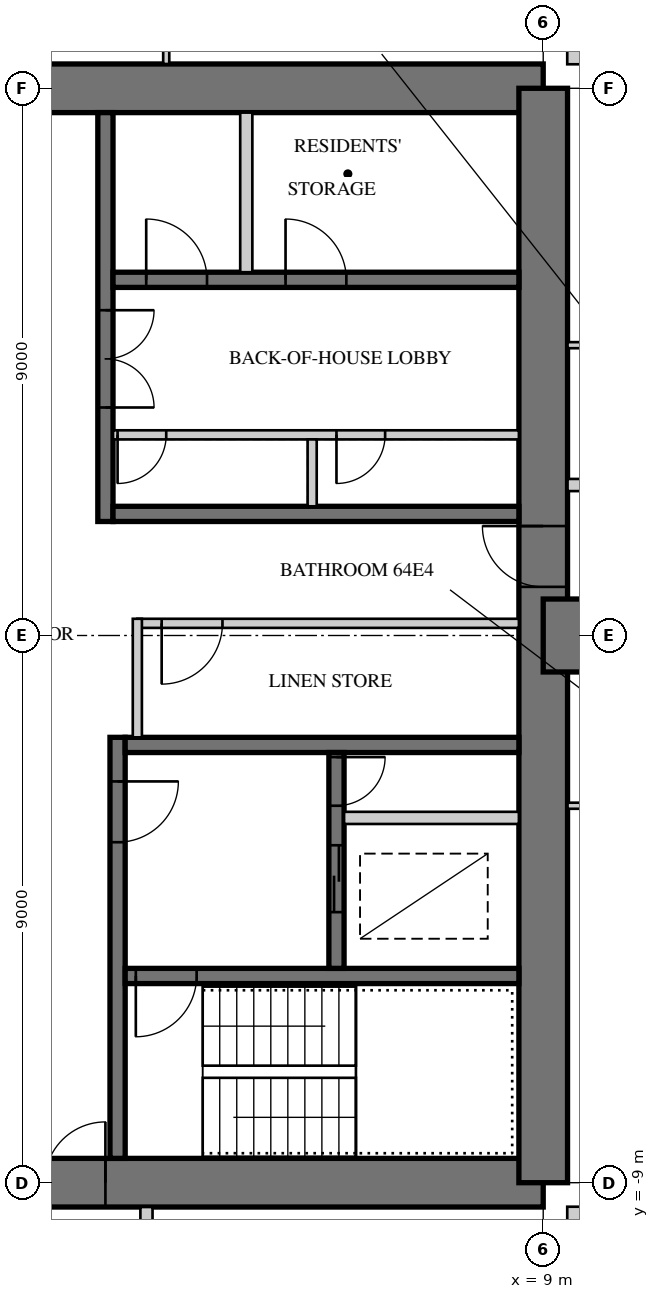
"""IFC4 building model, lengths in metres.
Left out: names, types, materials, properties, quantities, classifications, styles, units other than length and angle.
Written with IfcOpenShell. Run it as: python <this file> out.ifc"""

import sys

from ifc_helpers import new_model, si_unit, direction, frame, frame_2d, origin, place, context, subcontext, project, spatial, rectangle, extrude, element, fill, save


model = new_model("IFC4")
c1 = context("Model", 3, precision=1e-05, world=origin(), true_north=direction((0.0, 1.0)))
c2 = subcontext(c1, "Body", "Model", "MODEL_VIEW")
j1 = project(units=[si_unit("LENGTHUNIT", "METRE"), si_unit("PLANEANGLEUNIT", "RADIAN")], contexts=[c1])
p1 = place(None, origin())
s1 = spatial("IfcSite", under=j1, at=p1, CompositionType="ELEMENT")
p2 = place(p1, origin())
s2 = spatial("IfcBuilding", under=s1, at=p2, CompositionType="ELEMENT")
p3 = place(p2, frame((0.0, 0.0, 249.3)))
s3 = spatial("IfcBuildingStorey", under=s2, at=p3, CompositionType="ELEMENT", Elevation=249.3)
p4 = place(p3, frame((9.0, 9.0, 0.0), z_axis=(0.0, 0.0, 1.0), x_axis=(-1.0, 0.0, 0.0)))
e1 = element("IfcWall", 1, at=p4, inside=s3, PredefinedType="SHEAR", context=c2, shape_type="SweptSolid", body=[
    extrude(rectangle(XDim=18.0, YDim=0.8, at=frame_2d((9.0, 0.0))), origin(), (0.0, 0.0, 1.0), 3.4),
])
p5 = place(p4, frame((9.8, 0.0, 0.0)))
e2 = element("IfcOpeningElement", 2, at=p5, cuts=e1, PredefinedType="OPENING", context=c2, shape_type="SweptSolid", body=[
    extrude(rectangle(XDim=1.0, YDim=2.4, at=frame_2d((0.5, 1.2))), frame((0.0, 0.41, 0.0), z_axis=(0.0, -1.0, 0.0), x_axis=(1.0, 0.0, 0.0)), (0.0, 0.0, 1.0), 0.82),
])
p6 = place(p3, frame((-9.0, -9.0, 0.0), z_axis=(0.0, 0.0, 1.0), x_axis=(1.0, 0.0, 0.0)))
e3 = element("IfcWall", 3, at=p6, inside=s3, PredefinedType="SHEAR", context=c2, shape_type="SweptSolid", body=[
    extrude(rectangle(XDim=18.0, YDim=0.8, at=frame_2d((9.0, 0.0))), origin(), (0.0, 0.0, 1.0), 3.4),
])
p7 = place(p6, frame((9.8, 0.0, 0.0)))
e4 = element("IfcOpeningElement", 4, at=p7, cuts=e3, PredefinedType="OPENING", context=c2, shape_type="SweptSolid", body=[
    extrude(rectangle(XDim=1.0, YDim=2.4, at=frame_2d((0.5, 1.2))), frame((0.0, 0.41, 0.0), z_axis=(0.0, -1.0, 0.0), x_axis=(1.0, 0.0, 0.0)), (0.0, 0.0, 1.0), 0.82),
])
p8 = place(p3, frame((9.0, -9.0, 0.0), z_axis=(0.0, 0.0, 1.0), x_axis=(0.0, 1.0, 0.0)))
e5 = element("IfcWall", 5, at=p8, inside=s3, PredefinedType="SHEAR", context=c2, shape_type="SweptSolid", body=[
    extrude(rectangle(XDim=18.0, YDim=0.8, at=frame_2d((9.0, 0.0))), origin(), (0.0, 0.0, 1.0), 3.4),
])
p9 = place(p8, frame((9.8, 0.0, 0.0)))
e6 = element("IfcOpeningElement", 6, at=p9, cuts=e5, PredefinedType="OPENING", context=c2, shape_type="SweptSolid", body=[
    extrude(rectangle(XDim=1.0, YDim=2.4, at=frame_2d((0.5, 1.2))), frame((0.0, 0.41, 0.0), z_axis=(0.0, -1.0, 0.0), x_axis=(1.0, 0.0, 0.0)), (0.0, 0.0, 1.0), 0.82),
])
p10 = place(p3, frame((1.8, 1.875, 0.0), z_axis=(0.0, 0.0, 1.0), x_axis=(0.0, 1.0, 0.0)))
e7 = element("IfcWall", 7, at=p10, inside=s3, PredefinedType="SHEAR", context=c2, shape_type="SweptSolid", body=[
    extrude(rectangle(XDim=6.725, YDim=0.25, at=frame_2d((3.363, 0.0))), origin(), (0.0, 0.0, 1.0), 3.4),
])
p11 = place(p10, frame((1.875, 0.0, 0.0)))
e8 = element("IfcOpeningElement", 8, at=p11, cuts=e7, PredefinedType="OPENING", context=c2, shape_type="SweptSolid", body=[
    extrude(rectangle(XDim=1.6, YDim=2.4, at=frame_2d((0.8, 1.2))), frame((0.0, 0.135, 0.0), z_axis=(0.0, -1.0, 0.0), x_axis=(1.0, 0.0, 0.0)), (0.0, 0.0, 1.0), 0.27),
])
p12 = place(p3, frame((1.925, 2.0, 0.0), z_axis=(0.0, 0.0, 1.0), x_axis=(1.0, 0.0, 0.0)))
e9 = element("IfcWall", 9, at=p12, inside=s3, PredefinedType="SHEAR", context=c2, shape_type="SweptSolid", body=[
    extrude(rectangle(XDim=6.675, YDim=0.25, at=frame_2d((3.337, 0.0))), origin(), (0.0, 0.0, 1.0), 3.4),
])
p13 = place(p3, frame((1.925, 5.85, 0.0), z_axis=(0.0, 0.0, 1.0), x_axis=(1.0, 0.0, 0.0)))
e10 = element("IfcWall", 10, at=p13, inside=s3, PredefinedType="SHEAR", context=c2, shape_type="SweptSolid", body=[
    extrude(rectangle(XDim=6.675, YDim=0.25, at=frame_2d((3.337, 0.0))), origin(), (0.0, 0.0, 1.0), 3.4),
])
p14 = place(p13, frame((0.546, 0.0, 0.0)))
e11 = element("IfcOpeningElement", 11, at=p14, cuts=e10, PredefinedType="OPENING", context=c2, shape_type="SweptSolid", body=[
    extrude(rectangle(XDim=1.0, YDim=2.1, at=frame_2d((0.5, 1.05))), frame((0.0, 0.135, 0.0), z_axis=(0.0, -1.0, 0.0), x_axis=(1.0, 0.0, 0.0)), (0.0, 0.0, 1.0), 0.27),
])
p15 = place(p13, frame((2.837, 0.0, 0.0)))
e12 = element("IfcOpeningElement", 12, at=p15, cuts=e10, PredefinedType="OPENING", context=c2, shape_type="SweptSolid", body=[
    extrude(rectangle(XDim=1.0, YDim=2.1, at=frame_2d((0.5, 1.05))), frame((0.0, 0.135, 0.0), z_axis=(0.0, -1.0, 0.0), x_axis=(1.0, 0.0, 0.0)), (0.0, 0.0, 1.0), 0.27),
])
p16 = place(p3, frame((1.925, 3.3, 0.0), z_axis=(0.0, 0.0, 1.0), x_axis=(1.0, 0.0, 0.0)))
e13 = element("IfcWall", 13, at=p16, inside=s3, PredefinedType="PARTITIONING", context=c2, shape_type="SweptSolid", body=[
    extrude(rectangle(XDim=6.675, YDim=0.15, at=frame_2d((3.337, 0.0))), origin(), (0.0, 0.0, 1.0), 3.4),
])
p17 = place(p16, frame((0.075, 0.0, 0.0)))
e14 = element("IfcOpeningElement", 14, at=p17, cuts=e13, PredefinedType="OPENING", context=c2, shape_type="SweptSolid", body=[
    extrude(rectangle(XDim=0.8, YDim=2.1, at=frame_2d((0.4, 1.05))), frame((0.0, 0.085, 0.0), z_axis=(0.0, -1.0, 0.0), x_axis=(1.0, 0.0, 0.0)), (0.0, 0.0, 1.0), 0.17),
])
p18 = place(p16, frame((3.675, 0.0, 0.0)))
e15 = element("IfcOpeningElement", 15, at=p18, cuts=e13, PredefinedType="OPENING", context=c2, shape_type="SweptSolid", body=[
    extrude(rectangle(XDim=0.8, YDim=2.1, at=frame_2d((0.4, 1.05))), frame((0.0, 0.085, 0.0), z_axis=(0.0, -1.0, 0.0), x_axis=(1.0, 0.0, 0.0)), (0.0, 0.0, 1.0), 0.17),
])
p19 = place(p3, frame((5.2, 2.125, 0.0), z_axis=(0.0, 0.0, 1.0), x_axis=(0.0, 1.0, 0.0)))
e16 = element("IfcWall", 16, at=p19, inside=s3, PredefinedType="PARTITIONING", context=c2, shape_type="SweptSolid", body=[
    extrude(rectangle(XDim=1.1, YDim=0.15, at=frame_2d((0.55, 0.0))), origin(), (0.0, 0.0, 1.0), 3.4),
])
p20 = place(p3, frame((4.117, 5.975, 0.0), z_axis=(0.0, 0.0, 1.0), x_axis=(0.0, 1.0, 0.0)))
e17 = element("IfcWall", 17, at=p20, inside=s3, PredefinedType="PARTITIONING", context=c2, shape_type="SweptSolid", body=[
    extrude(rectangle(XDim=2.625, YDim=0.2, at=frame_2d((1.312, 0.0))), origin(), (0.0, 0.0, 1.0), 3.4),
])
p21 = place(p3, frame((2.0, -1.675, 0.0), z_axis=(0.0, 0.0, 1.0), x_axis=(0.0, -1.0, 0.0)))
e18 = element("IfcWall", 18, at=p21, inside=s3, PredefinedType="SHEAR", context=c2, shape_type="SweptSolid", body=[
    extrude(rectangle(XDim=6.925, YDim=0.25, at=frame_2d((3.462, 0.0))), origin(), (0.0, 0.0, 1.0), 3.4),
])
p22 = place(p21, frame((0.725, 0.0, 0.0)))
e19 = element("IfcOpeningElement", 19, at=p22, cuts=e18, PredefinedType="OPENING", context=c2, shape_type="SweptSolid", body=[
    extrude(rectangle(XDim=1.0, YDim=2.1, at=frame_2d((0.5, 1.05))), frame((0.0, 0.135, 0.0), z_axis=(0.0, -1.0, 0.0), x_axis=(1.0, 0.0, 0.0)), (0.0, 0.0, 1.0), 0.27),
])
p23 = place(p3, frame((2.125, -1.8, 0.0), z_axis=(0.0, 0.0, 1.0), x_axis=(1.0, 0.0, 0.0)))
e20 = element("IfcWall", 20, at=p23, inside=s3, PredefinedType="SHEAR", context=c2, shape_type="SweptSolid", body=[
    extrude(rectangle(XDim=6.475, YDim=0.25, at=frame_2d((3.238, 0.0))), origin(), (0.0, 0.0, 1.0), 3.4),
])
p24 = place(p3, frame((2.125, -5.6, 0.0), z_axis=(0.0, 0.0, 1.0), x_axis=(1.0, 0.0, 0.0)))
e21 = element("IfcWall", 21, at=p24, inside=s3, PredefinedType="SHEAR", context=c2, shape_type="SweptSolid", body=[
    extrude(rectangle(XDim=6.475, YDim=0.25, at=frame_2d((3.238, 0.0))), origin(), (0.0, 0.0, 1.0), 3.4),
])
p25 = place(p24, frame((0.175, 0.0, 0.0)))
e22 = element("IfcOpeningElement", 22, at=p25, cuts=e21, PredefinedType="OPENING", context=c2, shape_type="SweptSolid", body=[
    extrude(rectangle(XDim=1.0, YDim=2.1, at=frame_2d((0.5, 1.05))), frame((0.0, 0.135, 0.0), z_axis=(0.0, -1.0, 0.0), x_axis=(1.0, 0.0, 0.0)), (0.0, 0.0, 1.0), 0.27),
])
p26 = place(p3, frame((5.6, -1.925, 0.0), z_axis=(0.0, 0.0, 1.0), x_axis=(0.0, -1.0, 0.0)))
e23 = element("IfcWall", 23, at=p26, inside=s3, PredefinedType="SHEAR", context=c2, shape_type="SweptSolid", body=[
    extrude(rectangle(XDim=3.55, YDim=0.25, at=frame_2d((1.775, 0.0))), origin(), (0.0, 0.0, 1.0), 3.4),
])
p27 = place(p26, frame((1.525, 0.0, 0.0)))
e24 = element("IfcOpeningElement", 24, at=p27, cuts=e23, PredefinedType="OPENING", context=c2, shape_type="SweptSolid", body=[
    extrude(rectangle(XDim=1.1, YDim=2.2, at=frame_2d((0.55, 1.1))), frame((0.0, 0.135, 0.0), z_axis=(0.0, -1.0, 0.0), x_axis=(1.0, 0.0, 0.0)), (0.0, 0.0, 1.0), 0.27),
])
p28 = place(p26, frame((0.075, 0.0, 0.0)))
e25 = element("IfcOpeningElement", 25, at=p28, cuts=e23, PredefinedType="OPENING", context=c2, shape_type="SweptSolid", body=[
    extrude(rectangle(XDim=0.8, YDim=2.1, at=frame_2d((0.4, 1.05))), frame((0.0, 0.135, 0.0), z_axis=(0.0, -1.0, 0.0), x_axis=(1.0, 0.0, 0.0)), (0.0, 0.0, 1.0), 0.27),
])
p29 = place(p3, frame((5.725, -3.0, 0.0), z_axis=(0.0, 0.0, 1.0), x_axis=(1.0, 0.0, 0.0)))
e26 = element("IfcWall", 26, at=p29, inside=s3, PredefinedType="PARTITIONING", context=c2, shape_type="SweptSolid", body=[
    extrude(rectangle(XDim=2.875, YDim=0.2, at=frame_2d((1.438, 0.0))), origin(), (0.0, 0.0, 1.0), 3.4),
])
p30 = place(p3, frame((9.0, 0.0, 0.0), z_axis=(0.0, 0.0, 1.0), x_axis=(1.0, 0.0, 0.0)))
e27 = element("IfcWall", 27, at=p30, inside=s3, PredefinedType="SHEAR", context=c2, shape_type="SweptSolid", body=[
    extrude(rectangle(XDim=9.0, YDim=1.2, at=frame_2d((4.5, 0.0))), origin(), (0.0, 0.0, 1.0), 3.4),
])
p31 = place(p30, frame((3.8, 0.0, 0.0)))
e28 = element("IfcOpeningElement", 28, at=p31, cuts=e27, PredefinedType="OPENING", context=c2, shape_type="SweptSolid", body=[
    extrude(rectangle(XDim=1.0, YDim=2.15, at=frame_2d((0.5, 1.075))), frame((0.0, 0.61, 0.0), z_axis=(0.0, -1.0, 0.0), x_axis=(1.0, 0.0, 0.0)), (0.0, 0.0, 1.0), 1.22),
])
p32 = place(p30, frame((7.0, 0.0, 0.0)))
e29 = element("IfcOpeningElement", 29, at=p32, cuts=e27, PredefinedType="OPENING", context=c2, shape_type="SweptSolid", body=[
    extrude(rectangle(XDim=1.0, YDim=2.2, at=frame_2d((0.5, 1.1))), frame((0.0, 0.61, 0.0), z_axis=(0.0, -1.0, 0.0), x_axis=(1.0, 0.0, 0.0)), (0.0, 0.0, 1.0), 1.22),
])
p33 = place(p3, frame((9.395, -9.52, 0.0), z_axis=(0.0, 0.0, 1.0), x_axis=(1.0, 0.0, 0.0)))
e30 = element("IfcWall", 30, at=p33, inside=s3, PredefinedType="SOLIDWALL", context=c2, shape_type="SweptSolid", body=[
    extrude(rectangle(XDim=3.125, YDim=0.25, at=frame_2d((1.562, 0.0))), origin(), (0.0, 0.0, 1.0), 3.15),
])
p34 = place(p33, frame((0.6, 0.0, 0.0)))
e31 = element("IfcOpeningElement", 31, at=p34, cuts=e30, PredefinedType="OPENING", context=c2, shape_type="SweptSolid", body=[
    extrude(rectangle(XDim=1.0, YDim=2.2, at=frame_2d((0.5, 1.1))), frame((0.0, 0.135, 0.0), z_axis=(0.0, -1.0, 0.0), x_axis=(1.0, 0.0, 0.0)), (0.0, 0.0, 1.0), 0.27),
])
p35 = place(p3, frame((9.52, 9.395, 0.0), z_axis=(0.0, 0.0, 1.0), x_axis=(0.0, 1.0, 0.0)))
e32 = element("IfcWall", 32, at=p35, inside=s3, PredefinedType="SOLIDWALL", context=c2, shape_type="SweptSolid", body=[
    extrude(rectangle(XDim=3.125, YDim=0.25, at=frame_2d((1.562, 0.0))), origin(), (0.0, 0.0, 1.0), 3.15),
])
p36 = place(p35, frame((0.6, 0.0, 0.0)))
e33 = element("IfcOpeningElement", 33, at=p36, cuts=e32, PredefinedType="OPENING", context=c2, shape_type="SweptSolid", body=[
    extrude(rectangle(XDim=1.0, YDim=2.2, at=frame_2d((0.5, 1.1))), frame((0.0, 0.135, 0.0), z_axis=(0.0, -1.0, 0.0), x_axis=(1.0, 0.0, 0.0)), (0.0, 0.0, 1.0), 0.27),
])
p37 = place(p3, frame((2.325, 0.2, 0.0), z_axis=(0.0, 0.0, 1.0), x_axis=(1.0, 0.0, 0.0)))
e34 = element("IfcWall", 34, at=p37, inside=s3, PredefinedType="PARTITIONING", context=c2, shape_type="SweptSolid", body=[
    extrude(rectangle(XDim=6.275, YDim=0.15, at=frame_2d((3.138, 0.0))), origin(), (0.0, 0.0, 1.0), 3.15),
])
p38 = place(p37, frame((0.4, 0.0, 0.0)))
e35 = element("IfcOpeningElement", 35, at=p38, cuts=e34, PredefinedType="OPENING", context=c2, shape_type="SweptSolid", body=[
    extrude(rectangle(XDim=1.0, YDim=2.1, at=frame_2d((0.5, 1.05))), frame((0.0, 0.085, 0.0), z_axis=(0.0, -1.0, 0.0), x_axis=(1.0, 0.0, 0.0)), (0.0, 0.0, 1.0), 0.17),
])
p39 = place(p3, frame((2.325, -1.675, 0.0), z_axis=(0.0, 0.0, 1.0), x_axis=(0.0, 1.0, 0.0)))
e36 = element("IfcWall", 36, at=p39, inside=s3, PredefinedType="PARTITIONING", context=c2, shape_type="SweptSolid", body=[
    extrude(rectangle(XDim=1.95, YDim=0.15, at=frame_2d((0.975, 0.0))), origin(), (0.0, 0.0, 1.0), 3.15),
])
p40 = place(p3, frame((2.8, 9.4, 0.0), z_axis=(0.0, 0.0, 1.0), x_axis=(0.0, 1.0, 0.0)))
e37 = element("IfcWall", 37, at=p40, inside=s3, PredefinedType="PARTITIONING", context=c2, shape_type="SweptSolid", body=[
    extrude(rectangle(XDim=2.65, YDim=0.1, at=frame_2d((1.325, 0.0))), origin(), (0.0, 0.0, 1.0), 3.15),
])
p41 = place(p3, frame((9.4, 4.775, 0.0), z_axis=(0.0, 0.0, 1.0), x_axis=(1.0, 0.0, 0.0)))
e38 = element("IfcWall", 38, at=p41, inside=s3, PredefinedType="PARTITIONING", context=c2, shape_type="SweptSolid", body=[
    extrude(rectangle(XDim=3.25, YDim=0.1, at=frame_2d((1.625, 0.0))), origin(), (0.0, 0.0, 1.0), 3.15),
])
p42 = place(p3, frame((9.4, -2.8, 0.0), z_axis=(0.0, 0.0, 1.0), x_axis=(1.0, 0.0, 0.0)))
e39 = element("IfcWall", 39, at=p42, inside=s3, PredefinedType="PARTITIONING", context=c2, shape_type="SweptSolid", body=[
    extrude(rectangle(XDim=2.65, YDim=0.1, at=frame_2d((1.325, 0.0))), origin(), (0.0, 0.0, 1.0), 3.15),
])
p43 = place(p3, frame((9.4, 2.475, 0.0), z_axis=(0.0, 0.0, 1.0), x_axis=(1.0, 0.0, 0.0)))
e40 = element("IfcWall", 40, at=p43, inside=s3, PredefinedType="SOLIDWALL", context=c2, shape_type="SweptSolid", body=[
    extrude(rectangle(XDim=5.6, YDim=0.2, at=frame_2d((2.8, 0.0))), origin(), (0.0, 0.0, 1.0), 3.15),
])
p44 = place(p43, frame((3.75, 0.0, 0.0)))
e41 = element("IfcOpeningElement", 41, at=p44, cuts=e40, PredefinedType="OPENING", context=c2, shape_type="SweptSolid", body=[
    extrude(rectangle(XDim=1.0, YDim=2.15, at=frame_2d((0.5, 1.075))), frame((0.0, 0.11, 0.0), z_axis=(0.0, -1.0, 0.0), x_axis=(1.0, 0.0, 0.0)), (0.0, 0.0, 1.0), 0.22),
])
p45 = place(p3, frame((2.475, -9.4, 0.0), z_axis=(0.0, 0.0, 1.0), x_axis=(0.0, -1.0, 0.0)))
e42 = element("IfcWall", 42, at=p45, inside=s3, PredefinedType="SOLIDWALL", context=c2, shape_type="SweptSolid", body=[
    extrude(rectangle(XDim=5.6, YDim=0.2, at=frame_2d((2.8, 0.0))), origin(), (0.0, 0.0, 1.0), 3.15),
])
p46 = place(p45, frame((1.2, 0.0, 0.0)))
e43 = element("IfcOpeningElement", 43, at=p46, cuts=e42, PredefinedType="OPENING", context=c2, shape_type="SweptSolid", body=[
    extrude(rectangle(XDim=1.0, YDim=2.2, at=frame_2d((0.5, 1.1))), frame((0.0, 0.11, 0.0), z_axis=(0.0, -1.0, 0.0), x_axis=(1.0, 0.0, 0.0)), (0.0, 0.0, 1.0), 0.22),
])
p47 = place(p38, frame((1.0, 0.0, 0.0), z_axis=(0.0, 0.0, 1.0), x_axis=(-1.0, 0.0, 0.0)))
e44 = element("IfcDoor", 44, at=p47, inside=s3, OperationType="SINGLE_SWING_RIGHT", PredefinedType="DOOR", context=c2, shape_type="SweptSolid", body=[
    extrude(rectangle(XDim=1.0, YDim=2.1, at=frame_2d((0.5, 1.05))), frame((0.0, 0.025, 0.0), z_axis=(0.0, -1.0, 0.0), x_axis=(1.0, 0.0, 0.0)), (0.0, 0.0, 1.0), 0.05),
])
fill(e35, e44)
p48 = place(p7, origin())
e45 = element("IfcDoor", 45, at=p48, inside=s3, OperationType="SINGLE_SWING_RIGHT", PredefinedType="DOOR", context=c2, shape_type="SweptSolid", body=[
    extrude(rectangle(XDim=1.0, YDim=2.4, at=frame_2d((0.5, 1.2))), frame((0.0, 0.055, 0.0), z_axis=(0.0, -1.0, 0.0), x_axis=(1.0, 0.0, 0.0)), (0.0, 0.0, 1.0), 0.05),
])
fill(e4, e45)
p49 = place(p9, origin())
e46 = element("IfcDoor", 46, at=p49, inside=s3, OperationType="SINGLE_SWING_RIGHT", PredefinedType="DOOR", context=c2, shape_type="SweptSolid", body=[
    extrude(rectangle(XDim=1.0, YDim=2.4, at=frame_2d((0.5, 1.2))), frame((0.0, 0.055, 0.0), z_axis=(0.0, -1.0, 0.0), x_axis=(1.0, 0.0, 0.0)), (0.0, 0.0, 1.0), 0.05),
])
fill(e6, e46)
p50 = place(p11, frame((1.6, 0.0, 0.0), z_axis=(0.0, 0.0, 1.0), x_axis=(-1.0, 0.0, 0.0)))
e47 = element("IfcDoor", 47, at=p50, inside=s3, OperationType="DOUBLE_DOOR_SINGLE_SWING", PredefinedType="DOOR", context=c2, shape_type="SweptSolid", body=[
    extrude(rectangle(XDim=1.6, YDim=2.4, at=frame_2d((0.8, 1.2))), frame((0.0, 0.025, 0.0), z_axis=(0.0, -1.0, 0.0), x_axis=(1.0, 0.0, 0.0)), (0.0, 0.0, 1.0), 0.05),
])
fill(e8, e47)
p51 = place(p17, frame((0.8, 0.0, 0.0), z_axis=(0.0, 0.0, 1.0), x_axis=(-1.0, 0.0, 0.0)))
e48 = element("IfcDoor", 48, at=p51, inside=s3, OperationType="SINGLE_SWING_RIGHT", PredefinedType="DOOR", context=c2, shape_type="SweptSolid", body=[
    extrude(rectangle(XDim=0.8, YDim=2.1, at=frame_2d((0.4, 1.05))), frame((0.0, 0.025, 0.0), z_axis=(0.0, -1.0, 0.0), x_axis=(1.0, 0.0, 0.0)), (0.0, 0.0, 1.0), 0.05),
])
fill(e14, e48)
p52 = place(p18, frame((0.8, 0.0, 0.0), z_axis=(0.0, 0.0, 1.0), x_axis=(-1.0, 0.0, 0.0)))
e49 = element("IfcDoor", 49, at=p52, inside=s3, OperationType="SINGLE_SWING_RIGHT", PredefinedType="DOOR", context=c2, shape_type="SweptSolid", body=[
    extrude(rectangle(XDim=0.8, YDim=2.1, at=frame_2d((0.4, 1.05))), frame((0.0, 0.025, 0.0), z_axis=(0.0, -1.0, 0.0), x_axis=(1.0, 0.0, 0.0)), (0.0, 0.0, 1.0), 0.05),
])
fill(e15, e49)
p53 = place(p22, origin())
e50 = element("IfcDoor", 50, at=p53, inside=s3, OperationType="SINGLE_SWING_LEFT", PredefinedType="DOOR", context=c2, shape_type="SweptSolid", body=[
    extrude(rectangle(XDim=1.0, YDim=2.1, at=frame_2d((0.5, 1.05))), frame((0.0, 0.025, 0.0), z_axis=(0.0, -1.0, 0.0), x_axis=(1.0, 0.0, 0.0)), (0.0, 0.0, 1.0), 0.05),
])
fill(e19, e50)
p54 = place(p25, frame((1.0, 0.0, 0.0), z_axis=(0.0, 0.0, 1.0), x_axis=(-1.0, 0.0, 0.0)))
e51 = element("IfcDoor", 51, at=p54, inside=s3, OperationType="SINGLE_SWING_RIGHT", PredefinedType="DOOR", context=c2, shape_type="SweptSolid", body=[
    extrude(rectangle(XDim=1.0, YDim=2.1, at=frame_2d((0.5, 1.05))), frame((0.0, 0.025, 0.0), z_axis=(0.0, -1.0, 0.0), x_axis=(1.0, 0.0, 0.0)), (0.0, 0.0, 1.0), 0.05),
])
fill(e22, e51)
p55 = place(p27, origin())
e52 = element("IfcDoor", 52, at=p55, inside=s3, OperationType="DOUBLE_DOOR_SLIDING", PredefinedType="DOOR", context=c2, shape_type="SweptSolid", body=[
    extrude(rectangle(XDim=1.1, YDim=2.2, at=frame_2d((0.55, 1.1))), frame((0.0, 0.025, 0.0), z_axis=(0.0, -1.0, 0.0), x_axis=(1.0, 0.0, 0.0)), (0.0, 0.0, 1.0), 0.05),
])
fill(e24, e52)
p56 = place(p28, origin())
e53 = element("IfcDoor", 53, at=p56, inside=s3, OperationType="SINGLE_SWING_LEFT", PredefinedType="DOOR", context=c2, shape_type="SweptSolid", body=[
    extrude(rectangle(XDim=0.8, YDim=2.1, at=frame_2d((0.4, 1.05))), frame((0.0, 0.025, 0.0), z_axis=(0.0, -1.0, 0.0), x_axis=(1.0, 0.0, 0.0)), (0.0, 0.0, 1.0), 0.05),
])
fill(e25, e53)
p57 = place(p14, origin())
e54 = element("IfcDoor", 54, at=p57, inside=s3, OperationType="SINGLE_SWING_LEFT", PredefinedType="DOOR", context=c2, shape_type="SweptSolid", body=[
    extrude(rectangle(XDim=1.0, YDim=2.1, at=frame_2d((0.5, 1.05))), frame((0.0, 0.025, 0.0), z_axis=(0.0, -1.0, 0.0), x_axis=(1.0, 0.0, 0.0)), (0.0, 0.0, 1.0), 0.05),
])
fill(e11, e54)
p58 = place(p15, origin())
e55 = element("IfcDoor", 55, at=p58, inside=s3, OperationType="SINGLE_SWING_LEFT", PredefinedType="DOOR", context=c2, shape_type="SweptSolid", body=[
    extrude(rectangle(XDim=1.0, YDim=2.1, at=frame_2d((0.5, 1.05))), frame((0.0, 0.025, 0.0), z_axis=(0.0, -1.0, 0.0), x_axis=(1.0, 0.0, 0.0)), (0.0, 0.0, 1.0), 0.05),
])
fill(e12, e55)
save(model, sys.argv[1])
